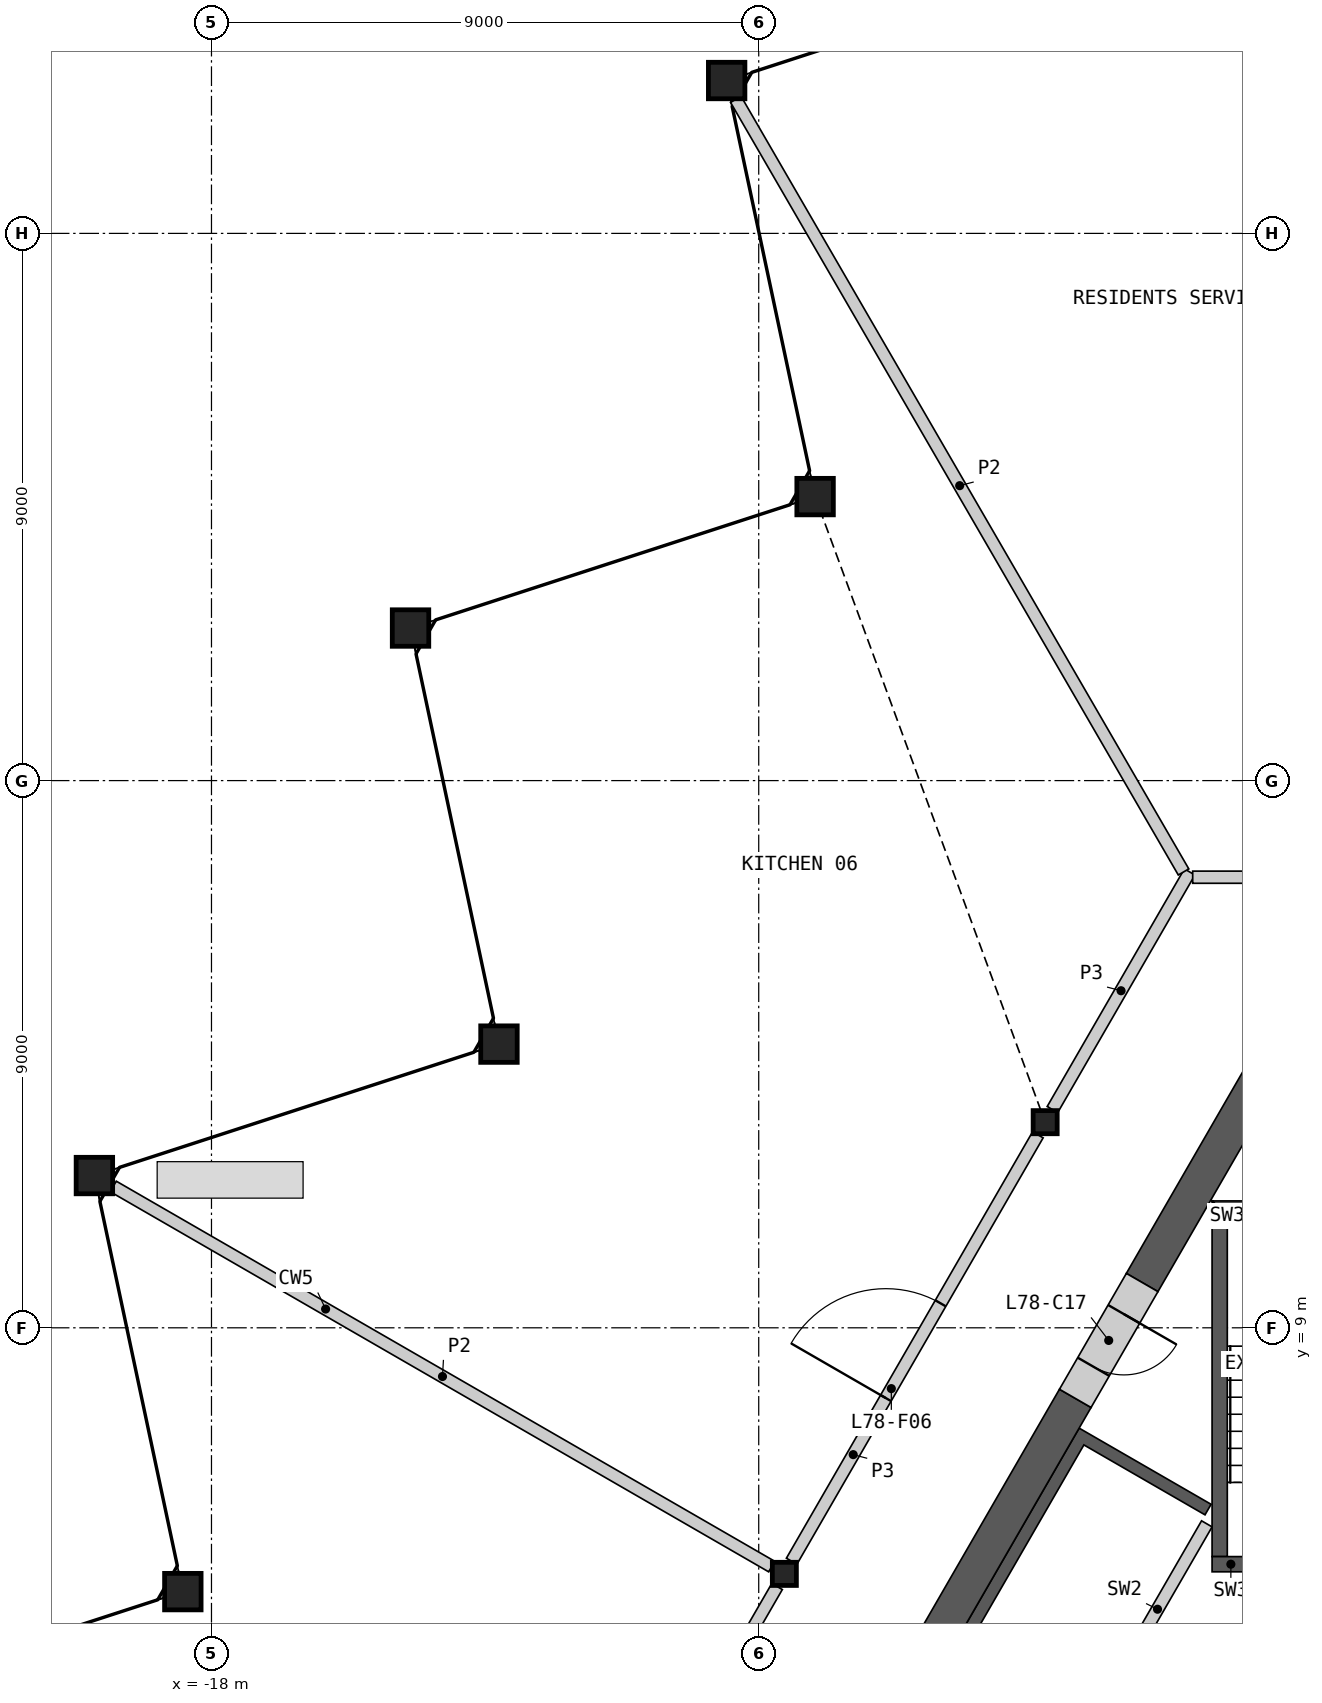
"""IFC4 building model, lengths in metres.
Left out: names, types, materials, properties, quantities, classifications, styles, units other than length and angle.
Written with IfcOpenShell. Run it as: python <this file> out.ifc"""

import sys

from ifc_helpers import new_model, si_unit, direction, frame, frame_2d, origin, origin_2d, place, context, subcontext, project, spatial, polyline, rectangle, hollow_rectangle, i_section, outline, extrude, element, fill, save


model = new_model("IFC4")
c1 = context("Model", 3, precision=1e-05, world=origin(), true_north=direction((0.0, 1.0)))
c2 = subcontext(c1, "Body", "Model", "MODEL_VIEW")
j1 = project(units=[si_unit("LENGTHUNIT", "METRE"), si_unit("PLANEANGLEUNIT", "RADIAN")], contexts=[c1])
p1 = place(None, origin())
s1 = spatial("IfcSite", under=j1, at=p1, CompositionType="ELEMENT")
p2 = place(p1, origin())
s2 = spatial("IfcBuilding", under=s1, at=p2, CompositionType="ELEMENT")
p3 = place(p2, frame((0.0, 0.0, 346.0)))
s3 = spatial("IfcBuildingStorey", under=s2, at=p3, CompositionType="ELEMENT", Elevation=346.0)
for number, where, z_axis, x_axis in (
    (1, (-9.527, 29.514, 0.0), (0.0, 0.0, 1.0), (1.0, 0.0, 0.0)),
    (2, (-8.073, 22.671, 0.0), (0.0, 0.0, 1.0), (1.0, 0.0, 0.0)),
    (3, (-14.727, 20.509, 0.0), (0.0, 0.0, 1.0), (1.0, 0.0, 0.0)),
    (4, (-13.272, 13.666, 0.0), (0.0, 0.0, 1.0), (1.0, 0.0, 0.0)),
    (5, (-19.926, 11.504, 0.0), (0.0, 0.0, 1.0), (1.0, 0.0, 0.0)),
    (6, (-18.471, 4.661, 0.0), (0.0, 0.0, 1.0), (1.0, 0.0, 0.0)),
):
    element("IfcColumn", number, at=place(p3, frame(where, z_axis=z_axis, x_axis=x_axis)), inside=s3, PredefinedType="COLUMN", context=c2, shape_type="SweptSolid", body=[
        extrude(hollow_rectangle(XDim=0.6, YDim=0.6, WallThickness=0.04, at=origin_2d()), origin(), (0.0, 0.0, 1.0), 10.0),
    ])
for number, where, z_axis, x_axis in (
    (7, (-4.289, 12.382, 0.0), (0.0, 0.0, 1.0), (1.0, 0.0, 0.0)),
    (8, (-8.578, 4.953, 0.0), (0.0, 0.0, 1.0), (1.0, 0.0, 0.0)),
):
    element("IfcColumn", number, at=place(p3, frame(where, z_axis=z_axis, x_axis=x_axis)), inside=s3, PredefinedType="COLUMN", context=c2, shape_type="SweptSolid", body=[
        extrude(i_section(OverallWidth=0.396, OverallDepth=0.381, WebThickness=0.019, FlangeThickness=0.03, at=origin_2d()), origin(), (0.0, 0.0, 1.0), 10.0),
    ])
p4 = place(p3, origin())
e9 = element("IfcWall", 9, at=p4, inside=s3, PredefinedType="SHEAR", context=c2, shape_type="SweptSolid", body=[
    extrude(outline(polyline([(-4.96, 0.208), (-7.131, 1.461), (-3.731, 7.35), (-1.561, 6.097), (-1.66, 5.924), (-3.652, 7.074), (-6.852, 1.531), (-4.861, 0.381), (-4.96, 0.208)])), origin(), (0.0, 0.0, 1.0), 9.7),
])
p5 = place(p3, frame((-1.631, 5.776, 0.0), z_axis=(0.0, 0.0, 1.0), x_axis=(-0.499992876559, -0.866029516466, 0.0)))
e10 = element("IfcWall", 10, at=p5, inside=s3, PredefinedType="SOLIDWALL", context=c2, shape_type="SweptSolid", body=[
    extrude(rectangle(XDim=6.486, YDim=0.2, at=frame_2d((3.243, 0.0))), origin(), (0.0, 0.0, 1.0), 9.7),
])
p6 = place(p5, frame((2.637, 0.0, 0.0)))
e11 = element("IfcOpeningElement", 11, at=p6, cuts=e10, PredefinedType="OPENING", context=c2, shape_type="SweptSolid", body=[
    extrude(rectangle(XDim=0.9, YDim=2.1, at=frame_2d((0.45, 1.05))), frame((0.0, 0.11, 0.0), z_axis=(0.0, -1.0, 0.0), x_axis=(1.0, 0.0, 0.0)), (0.0, 0.0, 1.0), 0.22),
])
p7 = place(p3, origin())
e12 = element("IfcWall", 12, at=p7, inside=s3, PredefinedType="SHEAR", context=c2, shape_type="SweptSolid", body=[
    extrude(outline(polyline([(1.544, 11.087), (-1.544, 11.087), (-1.294, 10.837), (1.294, 10.837), (1.544, 11.087)])), origin(), (0.0, 0.0, 1.0), 9.7),
])
p8 = place(p3, origin())
e13 = element("IfcWall", 13, at=p8, inside=s3, PredefinedType="SHEAR", context=c2, shape_type="SweptSolid", body=[
    extrude(outline(polyline([(-1.294, 10.837), (-1.544, 11.087), (-1.544, 5.237), (-1.294, 5.237), (-1.294, 10.837)])), origin(), (0.0, 0.0, 1.0), 9.7),
])
p9 = place(p3, frame((1.544, 5.112, 0.0), z_axis=(0.0, 0.0, 1.0), x_axis=(-1.0, 0.0, 0.0)))
e14 = element("IfcWall", 14, at=p9, inside=s3, PredefinedType="SHEAR", context=c2, shape_type="SweptSolid", body=[
    extrude(rectangle(XDim=3.088, YDim=0.25, at=frame_2d((1.544, 0.0))), origin(), (0.0, 0.0, 1.0), 9.7),
])
p10 = place(p9, frame((0.994, 0.0, 0.0)))
e15 = element("IfcOpeningElement", 15, at=p10, cuts=e14, PredefinedType="OPENING", context=c2, shape_type="SweptSolid", body=[
    extrude(rectangle(XDim=1.1, YDim=2.1, at=frame_2d((0.55, 1.05))), frame((0.0, 0.135, 0.0), z_axis=(0.0, -1.0, 0.0), x_axis=(1.0, 0.0, 0.0)), (0.0, 0.0, 1.0), 0.27),
])
p11 = place(p3, frame((-3.794, 7.84, 0.0), z_axis=(0.0, 0.0, 1.0), x_axis=(-0.499974747889, -0.866039982607, 0.0)))
e16 = element("IfcWall", 16, at=p11, inside=s3, PredefinedType="SHEAR", context=c2, shape_type="SweptSolid", body=[
    extrude(rectangle(XDim=7.092, YDim=0.6, at=frame_2d((3.546, 0.0))), origin(), (0.0, 0.0, 1.0), 9.7),
])
p12 = place(p3, frame((-0.26, 13.961, 0.0), z_axis=(0.0, 0.0, 1.0), x_axis=(-0.50000604952, -0.866021911064, 0.0)))
e17 = element("IfcWall", 17, at=p12, inside=s3, PredefinedType="SHEAR", context=c2, shape_type="SweptSolid", body=[
    extrude(rectangle(XDim=4.869, YDim=0.6, at=frame_2d((2.434, 0.0))), origin(), (0.0, 0.0, 1.0), 9.7),
])
p13 = place(p3, frame((-2.694, 9.745, 0.0), z_axis=(0.0, 0.0, 1.0), x_axis=(-0.50002983664, -0.866008176907, 0.0)))
e18 = element("IfcWall", 18, at=p13, inside=s3, PredefinedType="SHEAR", context=c2, shape_type="SweptSolid", body=[
    extrude(rectangle(XDim=2.2, YDim=0.6, at=frame_2d((1.1, 0.0))), origin(), (0.0, 0.0, 1.0), 9.7),
])
p14 = place(p13, frame((0.6, 0.0, 0.0)))
e19 = element("IfcOpeningElement", 19, at=p14, cuts=e18, PredefinedType="OPENING", context=c2, shape_type="SweptSolid", body=[
    extrude(rectangle(XDim=1.0, YDim=2.1, at=frame_2d((0.5, 1.05))), frame((0.0, 0.31, 0.0), z_axis=(0.0, -1.0, 0.0), x_axis=(1.0, 0.0, 0.0)), (0.0, 0.0, 1.0), 0.62),
])
p15 = place(p3, frame((-8.458, 5.16, 0.0), z_axis=(0.0, 0.0, 1.0), x_axis=(0.499984266882, 0.866034487114, 0.0)))
e20 = element("IfcWall", 20, at=p15, inside=s3, PredefinedType="PARTITIONING", context=c2, shape_type="SweptSolid", body=[
    extrude(rectangle(XDim=8.099, YDim=0.2, at=frame_2d((4.049, 0.0))), origin(), (0.0, 0.0, 1.0), 9.7),
])
p16 = place(p15, frame((3.099, 0.0, 0.0)))
e21 = element("IfcOpeningElement", 21, at=p16, cuts=e20, PredefinedType="OPENING", context=c2, shape_type="SweptSolid", body=[
    extrude(rectangle(XDim=1.8, YDim=2.1, at=frame_2d((0.9, 1.05))), frame((0.0, 0.11, 0.0), z_axis=(0.0, -1.0, 0.0), x_axis=(1.0, 0.0, 0.0)), (0.0, 0.0, 1.0), 0.22),
])
p17 = place(p3, frame((-12.748, -2.269, 0.0), z_axis=(0.0, 0.0, 1.0), x_axis=(0.499984266882, 0.866034487114, 0.0)))
e22 = element("IfcWall", 22, at=p17, inside=s3, PredefinedType="PARTITIONING", context=c2, shape_type="SweptSolid", body=[
    extrude(rectangle(XDim=8.099, YDim=0.2, at=frame_2d((4.049, 0.0))), origin(), (0.0, 0.0, 1.0), 9.7),
])
p18 = place(p17, frame((3.2, 0.0, 0.0)))
e23 = element("IfcOpeningElement", 23, at=p18, cuts=e22, PredefinedType="OPENING", context=c2, shape_type="SweptSolid", body=[
    extrude(rectangle(XDim=1.8, YDim=2.1, at=frame_2d((0.9, 1.05))), frame((0.0, 0.11, 0.0), z_axis=(0.0, -1.0, 0.0), x_axis=(1.0, 0.0, 0.0)), (0.0, 0.0, 1.0), 0.22),
])
p19 = place(p3, frame((-4.169, 12.59, 0.0), z_axis=(0.0, 0.0, 1.0), x_axis=(0.499950370306, 0.866054055606, 0.0)))
e24 = element("IfcWall", 24, at=p19, inside=s3, PredefinedType="PARTITIONING", context=c2, shape_type="SweptSolid", body=[
    extrude(rectangle(XDim=4.513, YDim=0.2, at=frame_2d((2.256, 0.0))), origin(), (0.0, 0.0, 1.0), 9.7),
])
p20 = place(p3, frame((-1.863, 16.411, 0.0), z_axis=(0.0, 0.0, 1.0), x_axis=(1.0, 0.0, 0.0)))
e25 = element("IfcWall", 25, at=p20, inside=s3, PredefinedType="PARTITIONING", context=c2, shape_type="SweptSolid", body=[
    extrude(rectangle(XDim=3.726, YDim=0.2, at=frame_2d((1.863, 0.0))), origin(), (0.0, 0.0, 1.0), 9.7),
])
p21 = place(p3, frame((-9.377, 29.204, 0.0), z_axis=(0.0, 0.0, 1.0), x_axis=(0.501398610674, -0.865216408313, 0.0)))
e26 = element("IfcWall", 26, at=p21, inside=s3, PredefinedType="PARTITIONING", context=c2, shape_type="SweptSolid", body=[
    extrude(rectangle(XDim=14.686, YDim=0.2, at=frame_2d((7.343, 0.0))), origin(), (0.0, 0.0, 1.0), 8.93),
])
p22 = place(p3, frame((-19.615, 11.325, 0.0), z_axis=(0.0, 0.0, 1.0), x_axis=(0.86602139559, -0.500006942333, 0.0)))
e27 = element("IfcWall", 27, at=p22, inside=s3, PredefinedType="PARTITIONING", context=c2, shape_type="SweptSolid", body=[
    extrude(rectangle(XDim=12.505, YDim=0.2, at=frame_2d((6.252, 0.0))), origin(), (0.0, 0.0, 1.0), 8.93),
])
p23 = place(p14, origin())
e28 = element("IfcDoor", 28, at=p23, inside=s3, OperationType="SINGLE_SWING_LEFT", PredefinedType="DOOR", context=c2, shape_type="SweptSolid", body=[
    extrude(rectangle(XDim=1.0, YDim=2.1, at=frame_2d((0.5, 1.05))), frame((0.0, 0.055, 0.0), z_axis=(0.0, -1.0, 0.0), x_axis=(1.0, 0.0, 0.0)), (0.0, 0.0, 1.0), 0.05),
])
fill(e19, e28)
p24 = place(p16, origin())
e29 = element("IfcDoor", 29, at=p24, inside=s3, OperationType="DOUBLE_DOOR_SINGLE_SWING", PredefinedType="DOOR", context=c2, shape_type="SweptSolid", body=[
    extrude(rectangle(XDim=1.8, YDim=2.1, at=frame_2d((0.9, 1.05))), frame((0.0, 0.025, 0.0), z_axis=(0.0, -1.0, 0.0), x_axis=(1.0, 0.0, 0.0)), (0.0, 0.0, 1.0), 0.05),
])
fill(e21, e29)
save(model, sys.argv[1])
